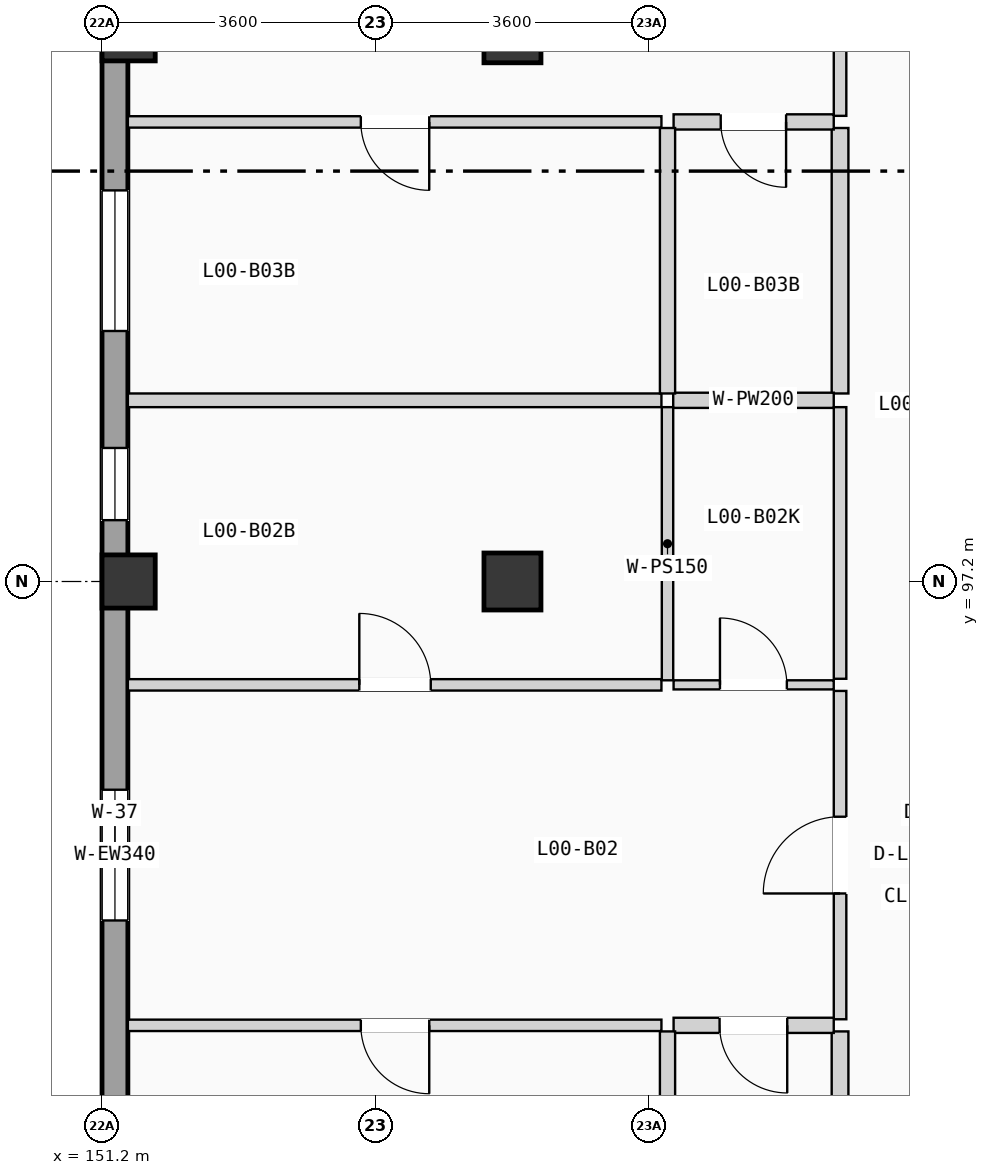
"""IFC4 building model, lengths in metres.
Left out: names, types, materials, properties, quantities, classifications, styles, units other than length and angle.
Written with IfcOpenShell. Run it as: python <this file> out.ifc"""

import sys

from ifc_helpers import new_model, si_unit, direction, frame, frame_2d, origin, origin_2d, place, context, subcontext, project, spatial, rectangle, extrude, element, fill, save


model = new_model("IFC4")
c1 = context("Model", 3, precision=1e-05, world=origin(), true_north=direction((0.0, 1.0)))
c2 = subcontext(c1, "Body", "Model", "MODEL_VIEW")
j1 = project(units=[si_unit("LENGTHUNIT", "METRE"), si_unit("PLANEANGLEUNIT", "RADIAN")], contexts=[c1])
p1 = place(None, origin())
s1 = spatial("IfcSite", under=j1, at=p1, CompositionType="ELEMENT")
p2 = place(p1, origin())
s2 = spatial("IfcBuilding", under=s1, at=p2, CompositionType="ELEMENT")
p3 = place(p2, origin())
s3 = spatial("IfcBuildingStorey", under=s2, at=p3, CompositionType="ELEMENT", Elevation=0.0)
for number, where, z_axis, x_axis in (
    (1, (151.55, 97.2, 0.0), (0.0, 0.0, 1.0), (1.0, 0.0, 0.0)),
    (2, (151.55, 104.4, 0.0), (0.0, 0.0, 1.0), (1.0, 0.0, 0.0)),
):
    element("IfcColumn", number, at=place(p3, frame(where, z_axis=z_axis, x_axis=x_axis)), inside=s3, PredefinedType="COLUMN", context=c2, shape_type="SweptSolid", body=[
        extrude(rectangle(XDim=0.7, YDim=0.7, at=origin_2d()), origin(), (0.0, 0.0, 1.0), 4.9),
    ])
for number, where, z_axis, x_axis in (
    (3, (156.6, 97.2, 0.0), (0.0, 0.0, 1.0), (1.0, 0.0, 0.0)),
    (4, (156.6, 104.4, 0.0), (0.0, 0.0, 1.0), (1.0, 0.0, 0.0)),
):
    element("IfcColumn", number, at=place(p3, frame(where, z_axis=z_axis, x_axis=x_axis)), inside=s3, PredefinedType="COLUMN", context=c2, shape_type="SweptSolid", body=[
        extrude(rectangle(XDim=0.75, YDim=0.75, at=origin_2d()), origin(), (0.0, 0.0, 1.0), 4.9),
    ])
p4 = place(p3, frame((151.37, 68.74, 0.0), z_axis=(0.0, 0.0, 1.0), x_axis=(0.0, 1.0, 0.0)))
e5 = element("IfcWall", 5, at=p4, inside=s3, PredefinedType="SOLIDWALL", context=c2, shape_type="SweptSolid", body=[
    extrude(rectangle(XDim=49.72, YDim=0.34, at=frame_2d((24.86, 0.0))), origin(), (0.0, 0.0, 1.0), 4.64),
])
p5 = place(p4, frame((11.552, 0.0, 0.9)))
e6 = element("IfcOpeningElement", 6, at=p5, cuts=e5, PredefinedType="OPENING", context=c2, shape_type="SweptSolid", body=[
    extrude(rectangle(XDim=1.6, YDim=1.65, at=frame_2d((0.8, 0.825))), frame((0.0, 0.18, 0.0), z_axis=(0.0, -1.0, 0.0), x_axis=(1.0, 0.0, 0.0)), (0.0, 0.0, 1.0), 0.36),
])
p6 = place(p4, frame((8.207, 0.0, 0.9)))
e7 = element("IfcOpeningElement", 7, at=p6, cuts=e5, PredefinedType="OPENING", context=c2, shape_type="SweptSolid", body=[
    extrude(rectangle(XDim=1.6, YDim=1.8, at=frame_2d((0.8, 0.9))), frame((0.0, 0.18, 0.0), z_axis=(0.0, -1.0, 0.0), x_axis=(1.0, 0.0, 0.0)), (0.0, 0.0, 1.0), 0.36),
])
p7 = place(p4, frame((16.18, 0.0, 0.9)))
e8 = element("IfcOpeningElement", 8, at=p7, cuts=e5, PredefinedType="OPENING", context=c2, shape_type="SweptSolid", body=[
    extrude(rectangle(XDim=1.72, YDim=1.2, at=frame_2d((0.86, 0.6))), frame((0.0, 0.18, 0.0), z_axis=(0.0, -1.0, 0.0), x_axis=(1.0, 0.0, 0.0)), (0.0, 0.0, 1.0), 0.36),
])
p8 = place(p4, frame((24.0, 0.0, 0.9)))
e9 = element("IfcOpeningElement", 9, at=p8, cuts=e5, PredefinedType="OPENING", context=c2, shape_type="SweptSolid", body=[
    extrude(rectangle(XDim=1.72, YDim=1.35, at=frame_2d((0.86, 0.675))), frame((0.0, 0.18, 0.0), z_axis=(0.0, -1.0, 0.0), x_axis=(1.0, 0.0, 0.0)), (0.0, 0.0, 1.0), 0.36),
])
p9 = place(p4, frame((19.503, 0.0, 0.85)))
e10 = element("IfcOpeningElement", 10, at=p9, cuts=e5, PredefinedType="OPENING", context=c2, shape_type="SweptSolid", body=[
    extrude(rectangle(XDim=0.95, YDim=1.2, at=frame_2d((0.475, 0.6))), frame((0.0, 0.18, 0.0), z_axis=(0.0, -1.0, 0.0), x_axis=(1.0, 0.0, 0.0)), (0.0, 0.0, 1.0), 0.36),
])
p10 = place(p4, frame((29.267, 0.0, 0.85)))
e11 = element("IfcOpeningElement", 11, at=p10, cuts=e5, PredefinedType="OPENING", context=c2, shape_type="SweptSolid", body=[
    extrude(rectangle(XDim=0.95, YDim=1.2, at=frame_2d((0.475, 0.6))), frame((0.0, 0.18, 0.0), z_axis=(0.0, -1.0, 0.0), x_axis=(1.0, 0.0, 0.0)), (0.0, 0.0, 1.0), 0.36),
])
p11 = place(p4, frame((36.508, 0.0, 0.9)))
e12 = element("IfcOpeningElement", 12, at=p11, cuts=e5, PredefinedType="OPENING", context=c2, shape_type="SweptSolid", body=[
    extrude(rectangle(XDim=1.72, YDim=1.8, at=frame_2d((0.86, 0.9))), frame((0.0, 0.18, 0.0), z_axis=(0.0, -1.0, 0.0), x_axis=(1.0, 0.0, 0.0)), (0.0, 0.0, 1.0), 0.36),
])
p12 = place(p4, frame((31.756, 0.0, 0.9)))
e13 = element("IfcOpeningElement", 13, at=p12, cuts=e5, PredefinedType="OPENING", context=c2, shape_type="SweptSolid", body=[
    extrude(rectangle(XDim=1.85, YDim=1.2, at=frame_2d((0.925, 0.6))), frame((0.0, 0.18, 0.0), z_axis=(0.0, -1.0, 0.0), x_axis=(1.0, 0.0, 0.0)), (0.0, 0.0, 1.0), 0.36),
])
p13 = place(p4, frame((39.788, 0.0, 0.9)))
e14 = element("IfcOpeningElement", 14, at=p13, cuts=e5, PredefinedType="OPENING", context=c2, shape_type="SweptSolid", body=[
    extrude(rectangle(XDim=1.85, YDim=1.35, at=frame_2d((0.925, 0.675))), frame((0.0, 0.18, 0.0), z_axis=(0.0, -1.0, 0.0), x_axis=(1.0, 0.0, 0.0)), (0.0, 0.0, 1.0), 0.36),
])
p14 = place(p3, frame((160.91, 91.44, 0.0), z_axis=(0.0, 0.0, 1.0), x_axis=(0.0, 1.0, 0.0)))
e15 = element("IfcWall", 15, at=p14, inside=s3, PredefinedType="PARTITIONING", context=c2, shape_type="SweptSolid", body=[
    extrude(rectangle(XDim=4.32, YDim=0.165, at=frame_2d((2.16, 0.0))), origin(), (0.0, 0.0, 1.0), 3.84),
])
p15 = place(p14, frame((1.655, 0.0, 0.0)))
e16 = element("IfcOpeningElement", 16, at=p15, cuts=e15, PredefinedType="OPENING", context=c2, shape_type="SweptSolid", body=[
    extrude(rectangle(XDim=1.01, YDim=2.11, at=frame_2d((0.505, 1.055))), frame((0.0, 0.093, 0.0), z_axis=(0.0, -1.0, 0.0), x_axis=(1.0, 0.0, 0.0)), (0.0, 0.0, 1.0), 0.185),
])
p16 = place(p3, frame((160.91, 87.706, 0.0), z_axis=(0.0, 0.0, 1.0), x_axis=(0.0, 1.0, 0.0)))
e17 = element("IfcWall", 17, at=p16, inside=s3, PredefinedType="PLUMBINGWALL", context=c2, shape_type="SweptSolid", body=[
    extrude(rectangle(XDim=3.574, YDim=0.22, at=frame_2d((1.787, 0.0))), origin(), (0.0, 0.0, 1.0), 3.84),
])
p17 = place(p3, frame((160.91, 95.92, 0.0), z_axis=(0.0, 0.0, 1.0), x_axis=(0.0, 1.0, 0.0)))
e18 = element("IfcWall", 18, at=p17, inside=s3, PredefinedType="PARTITIONING", context=c2, shape_type="SweptSolid", body=[
    extrude(rectangle(XDim=3.574, YDim=0.165, at=frame_2d((1.787, 0.0))), origin(), (0.0, 0.0, 1.0), 3.84),
])
p18 = place(p3, frame((160.91, 103.327, 0.0), z_axis=(0.0, 0.0, 1.0), x_axis=(0.0, 1.0, 0.0)))
e19 = element("IfcWall", 19, at=p18, inside=s3, PredefinedType="PARTITIONING", context=c2, shape_type="SweptSolid", body=[
    extrude(rectangle(XDim=4.22, YDim=0.165, at=frame_2d((2.11, 0.0))), origin(), (0.0, 0.0, 1.0), 3.84),
])
p19 = place(p18, frame((1.605, 0.0, 0.0)))
e20 = element("IfcOpeningElement", 20, at=p19, cuts=e19, PredefinedType="OPENING", context=c2, shape_type="SweptSolid", body=[
    extrude(rectangle(XDim=1.01, YDim=2.11, at=frame_2d((0.505, 1.055))), frame((0.0, 0.093, 0.0), z_axis=(0.0, -1.0, 0.0), x_axis=(1.0, 0.0, 0.0)), (0.0, 0.0, 1.0), 0.185),
])
p20 = place(p3, frame((160.91, 99.674, 0.0), z_axis=(0.0, 0.0, 1.0), x_axis=(0.0, 1.0, 0.0)))
e21 = element("IfcWall", 21, at=p20, inside=s3, PredefinedType="PLUMBINGWALL", context=c2, shape_type="SweptSolid", body=[
    extrude(rectangle(XDim=3.493, YDim=0.22, at=frame_2d((1.747, 0.0))), origin(), (0.0, 0.0, 1.0), 3.84),
])
p21 = place(p3, frame((158.72, 91.36, 0.0), z_axis=(0.0, 0.0, 1.0), x_axis=(1.0, 0.0, 0.0)))
e22 = element("IfcWall", 22, at=p21, inside=s3, PredefinedType="PLUMBINGWALL", context=c2, shape_type="SweptSolid", body=[
    extrude(rectangle(XDim=2.107, YDim=0.2, at=frame_2d((1.053, 0.0))), origin(), (0.0, 0.0, 1.0), 3.84),
])
p22 = place(p21, frame((0.605, 0.0, 0.0)))
e23 = element("IfcOpeningElement", 23, at=p22, cuts=e22, PredefinedType="OPENING", context=c2, shape_type="SweptSolid", body=[
    extrude(rectangle(XDim=0.89, YDim=2.03, at=frame_2d((0.445, 1.015))), frame((0.0, 0.11, 0.0), z_axis=(0.0, -1.0, 0.0), x_axis=(1.0, 0.0, 0.0)), (0.0, 0.0, 1.0), 0.22),
])
p23 = place(p3, frame((158.72, 95.84, 0.0), z_axis=(0.0, 0.0, 1.0), x_axis=(1.0, 0.0, 0.0)))
e24 = element("IfcWall", 24, at=p23, inside=s3, PredefinedType="PARTITIONING", context=c2, shape_type="SweptSolid", body=[
    extrude(rectangle(XDim=2.107, YDim=0.12, at=frame_2d((1.053, 0.0))), origin(), (0.0, 0.0, 1.0), 3.84),
])
p24 = place(p23, frame((0.61, 0.0, 0.0)))
e25 = element("IfcOpeningElement", 25, at=p24, cuts=e24, PredefinedType="OPENING", context=c2, shape_type="SweptSolid", body=[
    extrude(rectangle(XDim=0.88, YDim=2.02, at=frame_2d((0.44, 1.01))), frame((0.0, 0.07, 0.0), z_axis=(0.0, -1.0, 0.0), x_axis=(1.0, 0.0, 0.0)), (0.0, 0.0, 1.0), 0.14),
])
p25 = place(p3, frame((151.54, 91.36, 0.0), z_axis=(0.0, 0.0, 1.0), x_axis=(1.0, 0.0, 0.0)))
e26 = element("IfcWall", 26, at=p25, inside=s3, PredefinedType="PARTITIONING", context=c2, shape_type="SweptSolid", body=[
    extrude(rectangle(XDim=7.02, YDim=0.15, at=frame_2d((3.51, 0.0))), origin(), (0.0, 0.0, 1.0), 3.84),
])
p26 = place(p25, frame((3.065, 0.0, 0.0)))
e27 = element("IfcOpeningElement", 27, at=p26, cuts=e26, PredefinedType="OPENING", context=c2, shape_type="SweptSolid", body=[
    extrude(rectangle(XDim=0.9, YDim=2.04, at=frame_2d((0.45, 1.02))), frame((0.0, 0.085, 0.0), z_axis=(0.0, -1.0, 0.0), x_axis=(1.0, 0.0, 0.0)), (0.0, 0.0, 1.0), 0.17),
])
p27 = place(p3, frame((151.54, 95.84, 0.0), z_axis=(0.0, 0.0, 1.0), x_axis=(1.0, 0.0, 0.0)))
e28 = element("IfcWall", 28, at=p27, inside=s3, PredefinedType="PARTITIONING", context=c2, shape_type="SweptSolid", body=[
    extrude(rectangle(XDim=7.02, YDim=0.15, at=frame_2d((3.51, 0.0))), origin(), (0.0, 0.0, 1.0), 3.84),
])
p28 = place(p27, frame((3.045, 0.0, 0.0)))
e29 = element("IfcOpeningElement", 29, at=p28, cuts=e28, PredefinedType="OPENING", context=c2, shape_type="SweptSolid", body=[
    extrude(rectangle(XDim=0.94, YDim=2.06, at=frame_2d((0.47, 1.03))), frame((0.0, 0.085, 0.0), z_axis=(0.0, -1.0, 0.0), x_axis=(1.0, 0.0, 0.0)), (0.0, 0.0, 1.0), 0.17),
])
p29 = place(p3, frame((158.64, 87.706, 0.0), z_axis=(0.0, 0.0, 1.0), x_axis=(0.0, 1.0, 0.0)))
e30 = element("IfcWall", 30, at=p29, inside=s3, PredefinedType="PLUMBINGWALL", context=c2, shape_type="SweptSolid", body=[
    extrude(rectangle(XDim=3.574, YDim=0.2, at=frame_2d((1.787, 0.0))), origin(), (0.0, 0.0, 1.0), 3.84),
])
p30 = place(p3, frame((158.64, 95.9, 0.0), z_axis=(0.0, 0.0, 1.0), x_axis=(0.0, 1.0, 0.0)))
e31 = element("IfcWall", 31, at=p30, inside=s3, PredefinedType="PARTITIONING", context=c2, shape_type="SweptSolid", body=[
    extrude(rectangle(XDim=3.594, YDim=0.15, at=frame_2d((1.797, 0.0))), origin(), (0.0, 0.0, 1.0), 3.84),
])
p31 = place(p3, frame((158.715, 99.584, 0.0), z_axis=(0.0, 0.0, 1.0), x_axis=(1.0, 0.0, 0.0)))
e32 = element("IfcWall", 32, at=p31, inside=s3, PredefinedType="PLUMBINGWALL", context=c2, shape_type="SweptSolid", body=[
    extrude(rectangle(XDim=2.112, YDim=0.2, at=frame_2d((1.056, 0.0))), origin(), (0.0, 0.0, 1.0), 3.84),
])
p32 = place(p3, frame((151.54, 99.584, 0.0), z_axis=(0.0, 0.0, 1.0), x_axis=(1.0, 0.0, 0.0)))
e33 = element("IfcWall", 33, at=p32, inside=s3, PredefinedType="PARTITIONING", context=c2, shape_type="SweptSolid", body=[
    extrude(rectangle(XDim=7.02, YDim=0.18, at=frame_2d((3.51, 0.0))), origin(), (0.0, 0.0, 1.0), 3.84),
])
p33 = place(p3, frame((158.72, 103.247, 0.0), z_axis=(0.0, 0.0, 1.0), x_axis=(1.0, 0.0, 0.0)))
e34 = element("IfcWall", 34, at=p33, inside=s3, PredefinedType="PLUMBINGWALL", context=c2, shape_type="SweptSolid", body=[
    extrude(rectangle(XDim=2.107, YDim=0.2, at=frame_2d((1.053, 0.0))), origin(), (0.0, 0.0, 1.0), 3.84),
])
p34 = place(p33, frame((0.62, 0.0, 0.0)))
e35 = element("IfcOpeningElement", 35, at=p34, cuts=e34, PredefinedType="OPENING", context=c2, shape_type="SweptSolid", body=[
    extrude(rectangle(XDim=0.86, YDim=2.0, at=frame_2d((0.43, 1.0))), frame((0.0, 0.11, 0.0), z_axis=(0.0, -1.0, 0.0), x_axis=(1.0, 0.0, 0.0)), (0.0, 0.0, 1.0), 0.22),
])
p35 = place(p3, frame((151.54, 103.247, 0.0), z_axis=(0.0, 0.0, 1.0), x_axis=(1.0, 0.0, 0.0)))
e36 = element("IfcWall", 36, at=p35, inside=s3, PredefinedType="PARTITIONING", context=c2, shape_type="SweptSolid", body=[
    extrude(rectangle(XDim=7.02, YDim=0.15, at=frame_2d((3.51, 0.0))), origin(), (0.0, 0.0, 1.0), 3.84),
])
p36 = place(p35, frame((3.065, 0.0, 0.0)))
e37 = element("IfcOpeningElement", 37, at=p36, cuts=e36, PredefinedType="OPENING", context=c2, shape_type="SweptSolid", body=[
    extrude(rectangle(XDim=0.9, YDim=2.04, at=frame_2d((0.45, 1.02))), frame((0.0, 0.085, 0.0), z_axis=(0.0, -1.0, 0.0), x_axis=(1.0, 0.0, 0.0)), (0.0, 0.0, 1.0), 0.17),
])
p37 = place(p3, frame((158.64, 99.674, 0.0), z_axis=(0.0, 0.0, 1.0), x_axis=(0.0, 1.0, 0.0)))
e38 = element("IfcWall", 38, at=p37, inside=s3, PredefinedType="PLUMBINGWALL", context=c2, shape_type="SweptSolid", body=[
    extrude(rectangle(XDim=3.493, YDim=0.2, at=frame_2d((1.747, 0.0))), origin(), (0.0, 0.0, 1.0), 3.84),
])
p38 = place(p8, origin())
e39 = element("IfcWindow", 39, at=p38, inside=s3, PartitioningType="DOUBLE_PANEL_VERTICAL", PredefinedType="WINDOW", context=c2, shape_type="SweptSolid", body=[
    extrude(rectangle(XDim=1.72, YDim=1.35, at=frame_2d((0.86, 0.675))), frame((0.0, 0.03, 0.0), z_axis=(0.0, -1.0, 0.0), x_axis=(1.0, 0.0, 0.0)), (0.0, 0.0, 1.0), 0.06),
])
fill(e9, e39)
p39 = place(p10, origin())
e40 = element("IfcWindow", 40, at=p39, inside=s3, PartitioningType="SINGLE_PANEL", PredefinedType="WINDOW", context=c2, shape_type="SweptSolid", body=[
    extrude(rectangle(XDim=0.95, YDim=1.2, at=frame_2d((0.475, 0.6))), frame((0.0, 0.03, 0.0), z_axis=(0.0, -1.0, 0.0), x_axis=(1.0, 0.0, 0.0)), (0.0, 0.0, 1.0), 0.06),
])
fill(e11, e40)
p40 = place(p12, origin())
e41 = element("IfcWindow", 41, at=p40, inside=s3, PartitioningType="DOUBLE_PANEL_VERTICAL", PredefinedType="WINDOW", context=c2, shape_type="SweptSolid", body=[
    extrude(rectangle(XDim=1.85, YDim=1.2, at=frame_2d((0.925, 0.6))), frame((0.0, 0.03, 0.0), z_axis=(0.0, -1.0, 0.0), x_axis=(1.0, 0.0, 0.0)), (0.0, 0.0, 1.0), 0.06),
])
fill(e13, e41)
p41 = place(p15, origin())
e42 = element("IfcDoor", 42, at=p41, inside=s3, OperationType="SINGLE_SWING_LEFT", PredefinedType="DOOR", context=c2, shape_type="SweptSolid", body=[
    extrude(rectangle(XDim=1.01, YDim=2.11, at=frame_2d((0.505, 1.055))), frame((0.0, 0.025, 0.0), z_axis=(0.0, -1.0, 0.0), x_axis=(1.0, 0.0, 0.0)), (0.0, 0.0, 1.0), 0.05),
])
fill(e16, e42)
p42 = place(p22, frame((0.89, 0.0, 0.0), z_axis=(0.0, 0.0, 1.0), x_axis=(-1.0, 0.0, 0.0)))
e43 = element("IfcDoor", 43, at=p42, inside=s3, OperationType="SINGLE_SWING_RIGHT", PredefinedType="DOOR", context=c2, shape_type="SweptSolid", body=[
    extrude(rectangle(XDim=0.89, YDim=2.03, at=frame_2d((0.445, 1.015))), frame((0.0, 0.025, 0.0), z_axis=(0.0, -1.0, 0.0), x_axis=(1.0, 0.0, 0.0)), (0.0, 0.0, 1.0), 0.05),
])
fill(e23, e43)
p43 = place(p24, origin())
e44 = element("IfcDoor", 44, at=p43, inside=s3, OperationType="SINGLE_SWING_LEFT", PredefinedType="DOOR", context=c2, shape_type="SweptSolid", body=[
    extrude(rectangle(XDim=0.88, YDim=2.02, at=frame_2d((0.44, 1.01))), frame((0.0, 0.025, 0.0), z_axis=(0.0, -1.0, 0.0), x_axis=(1.0, 0.0, 0.0)), (0.0, 0.0, 1.0), 0.05),
])
fill(e25, e44)
p44 = place(p26, frame((0.9, 0.0, 0.0), z_axis=(0.0, 0.0, 1.0), x_axis=(-1.0, 0.0, 0.0)))
e45 = element("IfcDoor", 45, at=p44, inside=s3, OperationType="SINGLE_SWING_RIGHT", PredefinedType="DOOR", context=c2, shape_type="SweptSolid", body=[
    extrude(rectangle(XDim=0.9, YDim=2.04, at=frame_2d((0.45, 1.02))), frame((0.0, 0.025, 0.0), z_axis=(0.0, -1.0, 0.0), x_axis=(1.0, 0.0, 0.0)), (0.0, 0.0, 1.0), 0.05),
])
fill(e27, e45)
p45 = place(p28, origin())
e46 = element("IfcDoor", 46, at=p45, inside=s3, OperationType="SINGLE_SWING_LEFT", PredefinedType="DOOR", context=c2, shape_type="SweptSolid", body=[
    extrude(rectangle(XDim=0.94, YDim=2.06, at=frame_2d((0.47, 1.03))), frame((0.0, 0.025, 0.0), z_axis=(0.0, -1.0, 0.0), x_axis=(1.0, 0.0, 0.0)), (0.0, 0.0, 1.0), 0.05),
])
fill(e29, e46)
p46 = place(p34, frame((0.86, 0.0, 0.0), z_axis=(0.0, 0.0, 1.0), x_axis=(-1.0, 0.0, 0.0)))
e47 = element("IfcDoor", 47, at=p46, inside=s3, OperationType="SINGLE_SWING_RIGHT", PredefinedType="DOOR", context=c2, shape_type="SweptSolid", body=[
    extrude(rectangle(XDim=0.86, YDim=2.0, at=frame_2d((0.43, 1.0))), frame((0.0, 0.025, 0.0), z_axis=(0.0, -1.0, 0.0), x_axis=(1.0, 0.0, 0.0)), (0.0, 0.0, 1.0), 0.05),
])
fill(e35, e47)
p47 = place(p36, frame((0.9, 0.0, 0.0), z_axis=(0.0, 0.0, 1.0), x_axis=(-1.0, 0.0, 0.0)))
e48 = element("IfcDoor", 48, at=p47, inside=s3, OperationType="SINGLE_SWING_RIGHT", PredefinedType="DOOR", context=c2, shape_type="SweptSolid", body=[
    extrude(rectangle(XDim=0.9, YDim=2.04, at=frame_2d((0.45, 1.02))), frame((0.0, 0.025, 0.0), z_axis=(0.0, -1.0, 0.0), x_axis=(1.0, 0.0, 0.0)), (0.0, 0.0, 1.0), 0.05),
])
fill(e37, e48)
save(model, sys.argv[1])
